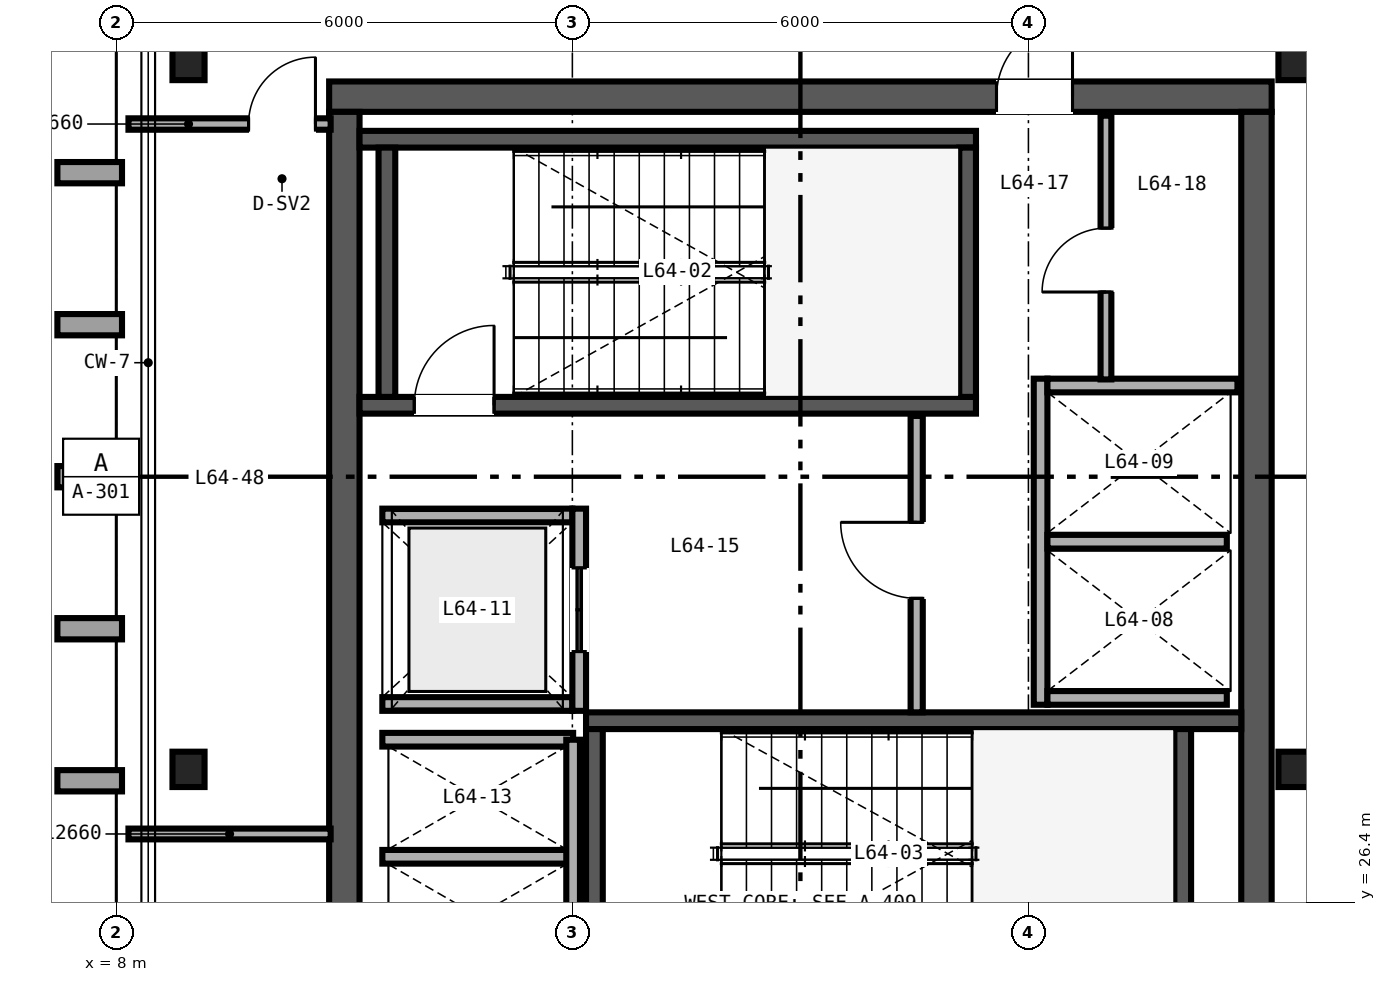
"""IFC4 building model, lengths in metres.
Left out: names, types, materials, properties, quantities, classifications, styles, units other than length and angle.
Written with IfcOpenShell. Run it as: python <this file> out.ifc"""

import sys

from ifc_helpers import new_model, si_unit, direction, frame, frame_2d, origin, origin_2d, place, context, subcontext, project, spatial, rectangle, i_section, extrude, source, transform, mapped, element, fill, save


model = new_model("IFC4")
c1 = context("Model", 3, precision=1e-05, world=origin(), true_north=direction((0.0, 1.0)))
c2 = subcontext(c1, "Body", "Model", "MODEL_VIEW")
j1 = project(units=[si_unit("LENGTHUNIT", "METRE"), si_unit("PLANEANGLEUNIT", "RADIAN")], contexts=[c1])
p1 = place(None, origin())
s1 = spatial("IfcSite", under=j1, at=p1, CompositionType="ELEMENT")
p2 = place(p1, origin())
s2 = spatial("IfcBuilding", under=s1, at=p2, CompositionType="ELEMENT")
p3 = place(p2, frame((0.0, 0.0, 254.4)))
s3 = spatial("IfcBuildingStorey", under=s2, at=p3, CompositionType="ELEMENT", Elevation=254.4)
p4 = place(p3, frame((10.8, 37.0, 0.0), z_axis=(0.0, 0.0, 1.0), x_axis=(1.0, 0.0, 0.0)))
e1 = element("IfcWall", 1, at=p4, inside=s3, PredefinedType="SHEAR", context=c2, shape_type="SweptSolid", body=[
    extrude(rectangle(XDim=12.4, YDim=0.4, at=frame_2d((6.2, 0.0))), origin(), (0.0, 0.0, 1.0), 3.38),
])
p5 = place(p4, frame((8.78, 0.0, 0.0)))
e2 = element("IfcOpeningElement", 2, at=p5, cuts=e1, PredefinedType="OPENING", context=c2, shape_type="SweptSolid", body=[
    extrude(rectangle(XDim=1.0, YDim=2.15, at=frame_2d((0.5, 1.075))), frame((0.0, 0.21, 0.0), z_axis=(0.0, -1.0, 0.0), x_axis=(1.0, 0.0, 0.0)), (0.0, 0.0, 1.0), 0.42),
])
for number, where, z_axis, x_axis in (
    (3, (11.0, 15.2, 0.0), (0.0, 0.0, 1.0), (0.0, 1.0, 0.0)),
    (4, (23.0, 15.2, 0.0), (0.0, 0.0, 1.0), (0.0, 1.0, 0.0)),
):
    element("IfcWall", number, at=place(p3, frame(where, z_axis=z_axis, x_axis=x_axis)), inside=s3, PredefinedType="SHEAR", context=c2, shape_type="SweptSolid", body=[
        extrude(rectangle(XDim=21.6, YDim=0.4, at=frame_2d((10.8, 0.0))), origin(), (0.0, 0.0, 1.0), 3.38),
    ])
p6 = place(p3, frame((11.2, 32.94, 0.0), z_axis=(0.0, 0.0, 1.0), x_axis=(1.0, 0.0, 0.0)))
e5 = element("IfcWall", 5, at=p6, inside=s3, PredefinedType="SHEAR", context=c2, shape_type="SweptSolid", body=[
    extrude(rectangle(XDim=8.11, YDim=0.22, at=frame_2d((4.055, 0.0))), origin(), (0.0, 0.0, 1.0), 3.4),
])
p7 = place(p6, frame((0.72, 0.0, 0.0)))
e6 = element("IfcOpeningElement", 6, at=p7, cuts=e5, PredefinedType="OPENING", context=c2, shape_type="SweptSolid", body=[
    extrude(rectangle(XDim=1.05, YDim=2.15, at=frame_2d((0.525, 1.075))), frame((0.0, 0.12, 0.0), z_axis=(0.0, -1.0, 0.0), x_axis=(1.0, 0.0, 0.0)), (0.0, 0.0, 1.0), 0.24),
])
p8 = place(p3, frame((11.2, 36.44, 0.0), z_axis=(0.0, 0.0, 1.0), x_axis=(1.0, 0.0, 0.0)))
e7 = element("IfcWall", 7, at=p8, inside=s3, PredefinedType="SHEAR", context=c2, shape_type="SweptSolid", body=[
    extrude(rectangle(XDim=8.11, YDim=0.22, at=frame_2d((4.055, 0.0))), origin(), (0.0, 0.0, 1.0), 3.4),
])
for number, where, z_axis, x_axis in (
    (8, (11.56, 33.05, 0.0), (0.0, 0.0, 1.0), (0.0, 1.0, 0.0)),
    (9, (19.2, 33.05, 0.0), (0.0, 0.0, 1.0), (0.0, 1.0, 0.0)),
):
    element("IfcWall", number, at=place(p3, frame(where, z_axis=z_axis, x_axis=x_axis)), inside=s3, PredefinedType="SHEAR", context=c2, shape_type="SweptSolid", body=[
        extrude(rectangle(XDim=3.28, YDim=0.22, at=frame_2d((1.64, 0.0))), origin(), (0.0, 0.0, 1.0), 3.4),
    ])
p9 = place(p3, frame((14.18, 28.79, 0.0), z_axis=(0.0, 0.0, 1.0), x_axis=(1.0, 0.0, 0.0)))
e10 = element("IfcWall", 10, at=p9, inside=s3, PredefinedType="SHEAR", context=c2, shape_type="SweptSolid", body=[
    extrude(rectangle(XDim=8.62, YDim=0.22, at=frame_2d((4.31, 0.0))), origin(), (0.0, 0.0, 1.0), 3.4),
])
for number, where, z_axis, x_axis in (
    (11, (14.29, 25.4, 0.0), (0.0, 0.0, 1.0), (0.0, 1.0, 0.0)),
    (12, (22.03, 25.4, 0.0), (0.0, 0.0, 1.0), (0.0, 1.0, 0.0)),
):
    element("IfcWall", number, at=place(p3, frame(where, z_axis=z_axis, x_axis=x_axis)), inside=s3, PredefinedType="SHEAR", context=c2, shape_type="SweptSolid", body=[
        extrude(rectangle(XDim=3.28, YDim=0.22, at=frame_2d((1.64, 0.0))), origin(), (0.0, 0.0, 1.0), 3.4),
    ])
m1 = source(origin(), c2, "Body", "SweptSolid", [
    extrude(i_section(OverallWidth=0.422, OverallDepth=0.465, WebThickness=0.045, FlangeThickness=0.073, FilletRadius=0.025, at=origin_2d()), origin(), (0.0, 0.0, 1.0), 3.38),
])
for number, where, z_axis, x_axis in (
    (13, (8.95, 28.15, 0.0), (0.0, 0.0, 1.0), (1.0, 0.0, 0.0)),
    (14, (23.5, 28.15, 0.0), (0.0, 0.0, 1.0), (1.0, 0.0, 0.0)),
    (15, (8.95, 37.45, 0.0), (0.0, 0.0, 1.0), (1.0, 0.0, 0.0)),
    (16, (23.5, 37.45, 0.0), (0.0, 0.0, 1.0), (1.0, 0.0, 0.0)),
):
    element("IfcColumn", number, at=place(p3, frame(where, z_axis=z_axis, x_axis=x_axis)), inside=s3, PredefinedType="COLUMN", context=c2, shape_type="MappedRepresentation", body=[
        mapped(m1, transform((0.0, 0.0, 0.0), scale=1.0)),
    ])
p10 = place(p3, frame((20.16, 29.0, 0.0), z_axis=(0.0, 0.0, 1.0), x_axis=(0.0, 1.0, 0.0)))
e17 = element("IfcWall", 17, at=p10, inside=s3, PredefinedType="SOLIDWALL", context=c2, shape_type="SweptSolid", body=[
    extrude(rectangle(XDim=4.29, YDim=0.18, at=frame_2d((2.145, 0.0))), origin(), (0.0, 0.0, 1.0), 3.38),
])
p11 = place(p3, frame((20.25, 29.09, 0.0), z_axis=(0.0, 0.0, 1.0), x_axis=(1.0, 0.0, 0.0)))
e18 = element("IfcWall", 18, at=p11, inside=s3, PredefinedType="SOLIDWALL", context=c2, shape_type="SweptSolid", body=[
    extrude(rectangle(XDim=2.36, YDim=0.18, at=frame_2d((1.18, 0.0))), origin(), (0.0, 0.0, 1.0), 3.38),
])
p12 = place(p3, frame((20.25, 33.2, 0.0), z_axis=(0.0, 0.0, 1.0), x_axis=(1.0, 0.0, 0.0)))
e19 = element("IfcWall", 19, at=p12, inside=s3, PredefinedType="SOLIDWALL", context=c2, shape_type="SweptSolid", body=[
    extrude(rectangle(XDim=2.5, YDim=0.18, at=frame_2d((1.25, 0.0))), origin(), (0.0, 0.0, 1.0), 3.38),
])
p13 = place(p3, frame((20.25, 31.145, 0.0), z_axis=(0.0, 0.0, 1.0), x_axis=(1.0, 0.0, 0.0)))
e20 = element("IfcWall", 20, at=p13, inside=s3, PredefinedType="SOLIDWALL", context=c2, shape_type="SweptSolid", body=[
    extrude(rectangle(XDim=2.36, YDim=0.18, at=frame_2d((1.18, 0.0))), origin(), (0.0, 0.0, 1.0), 3.38),
])
for number, where, z_axis, x_axis in (
    (21, (11.5, 29.01, 0.0), (0.0, 0.0, 1.0), (1.0, 0.0, 0.0)),
    (22, (11.5, 31.49, 0.0), (0.0, 0.0, 1.0), (1.0, 0.0, 0.0)),
):
    element("IfcWall", number, at=place(p3, frame(where, z_axis=z_axis, x_axis=x_axis)), inside=s3, PredefinedType="SOLIDWALL", context=c2, shape_type="SweptSolid", body=[
        extrude(rectangle(XDim=2.5, YDim=0.18, at=frame_2d((1.25, 0.0))), origin(), (0.0, 0.0, 1.0), 3.38),
    ])
p14 = place(p3, frame((14.09, 28.92, 0.0), z_axis=(0.0, 0.0, 1.0), x_axis=(0.0, 1.0, 0.0)))
e23 = element("IfcWall", 23, at=p14, inside=s3, PredefinedType="SOLIDWALL", context=c2, shape_type="SweptSolid", body=[
    extrude(rectangle(XDim=2.66, YDim=0.18, at=frame_2d((1.33, 0.0))), origin(), (0.0, 0.0, 1.0), 3.38),
])
p15 = place(p14, frame((0.78, 0.0, 0.0)))
e24 = element("IfcOpeningElement", 24, at=p15, cuts=e23, PredefinedType="OPENING", context=c2, shape_type="SweptSolid", body=[
    extrude(rectangle(XDim=1.1, YDim=2.2, at=frame_2d((0.55, 1.1))), frame((0.0, 0.1, 0.0), z_axis=(0.0, -1.0, 0.0), x_axis=(1.0, 0.0, 0.0)), (0.0, 0.0, 1.0), 0.2),
])
for number, where, z_axis, x_axis in (
    (25, (11.5, 27.0, 0.0), (0.0, 0.0, 1.0), (1.0, 0.0, 0.0)),
    (26, (11.5, 28.54, 0.0), (0.0, 0.0, 1.0), (1.0, 0.0, 0.0)),
):
    element("IfcWall", number, at=place(p3, frame(where, z_axis=z_axis, x_axis=x_axis)), inside=s3, PredefinedType="SOLIDWALL", context=c2, shape_type="SweptSolid", body=[
        extrude(rectangle(XDim=2.51, YDim=0.18, at=frame_2d((1.255, 0.0))), origin(), (0.0, 0.0, 1.0), 3.38),
    ])
p16 = place(p3, frame((14.01, 25.46, 0.0), z_axis=(0.0, 0.0, 1.0), x_axis=(0.0, 1.0, 0.0)))
e27 = element("IfcWall", 27, at=p16, inside=s3, PredefinedType="SOLIDWALL", context=c2, shape_type="SweptSolid", body=[
    extrude(rectangle(XDim=3.08, YDim=0.18, at=frame_2d((1.54, 0.0))), origin(), (0.0, 0.0, 1.0), 3.38),
])
p17 = place(p3, frame((18.53, 28.9, 0.0), z_axis=(0.0, 0.0, 1.0), x_axis=(0.0, 1.0, 0.0)))
e28 = element("IfcWall", 28, at=p17, inside=s3, PredefinedType="PARTITIONING", context=c2, shape_type="SweptSolid", body=[
    extrude(rectangle(XDim=3.9, YDim=0.16, at=frame_2d((1.95, 0.0))), origin(), (0.0, 0.0, 1.0), 3.38),
])
p18 = place(p17, frame((1.5, 0.0, 0.0)))
e29 = element("IfcOpeningElement", 29, at=p18, cuts=e28, PredefinedType="OPENING", context=c2, shape_type="SweptSolid", body=[
    extrude(rectangle(XDim=1.0, YDim=2.15, at=frame_2d((0.5, 1.075))), frame((0.0, 0.09, 0.0), z_axis=(0.0, -1.0, 0.0), x_axis=(1.0, 0.0, 0.0)), (0.0, 0.0, 1.0), 0.18),
])
p19 = place(p3, frame((21.02, 33.28, 0.0), z_axis=(0.0, 0.0, 1.0), x_axis=(0.0, 1.0, 0.0)))
e30 = element("IfcWall", 30, at=p19, inside=s3, PredefinedType="PARTITIONING", context=c2, shape_type="SweptSolid", body=[
    extrude(rectangle(XDim=3.47, YDim=0.142, at=frame_2d((1.735, 0.0))), origin(), (0.0, 0.0, 1.0), 3.38),
])
p20 = place(p19, frame((1.15, 0.0, 0.0)))
e31 = element("IfcOpeningElement", 31, at=p20, cuts=e30, PredefinedType="OPENING", context=c2, shape_type="SweptSolid", body=[
    extrude(rectangle(XDim=0.84, YDim=2.1, at=frame_2d((0.42, 1.05))), frame((0.0, 0.081, 0.0), z_axis=(0.0, -1.0, 0.0), x_axis=(1.0, 0.0, 0.0)), (0.0, 0.0, 1.0), 0.162),
])
p21 = place(p3, frame((8.16, 36.64, 0.0), z_axis=(0.0, 0.0, 1.0), x_axis=(1.0, 0.0, 0.0)))
e32 = element("IfcWall", 32, at=p21, inside=s3, PredefinedType="PARTITIONING", context=c2, shape_type="SweptSolid", body=[
    extrude(rectangle(XDim=2.66, YDim=0.15, at=frame_2d((1.33, 0.0))), origin(), (0.0, 0.0, 1.0), 2.763),
])
p22 = place(p21, frame((1.58, 0.0, 0.0)))
e33 = element("IfcOpeningElement", 33, at=p22, cuts=e32, PredefinedType="OPENING", context=c2, shape_type="SweptSolid", body=[
    extrude(rectangle(XDim=0.88, YDim=2.15, at=frame_2d((0.44, 1.075))), frame((0.0, 0.085, 0.0), z_axis=(0.0, -1.0, 0.0), x_axis=(1.0, 0.0, 0.0)), (0.0, 0.0, 1.0), 0.17),
])
p23 = place(p3, frame((8.16, 27.3, 0.0), z_axis=(0.0, 0.0, 1.0), x_axis=(1.0, 0.0, 0.0)))
e34 = element("IfcWall", 34, at=p23, inside=s3, PredefinedType="PARTITIONING", context=c2, shape_type="SweptSolid", body=[
    extrude(rectangle(XDim=2.66, YDim=0.142, at=frame_2d((1.33, 0.0))), origin(), (0.0, 0.0, 1.0), 2.601),
])
m2 = source(origin(), c2, "Body", "SweptSolid", [
    extrude(rectangle(XDim=1.05, YDim=2.15, at=frame_2d((0.525, 1.075))), frame((0.0, 0.025, 0.0), z_axis=(0.0, -1.0, 0.0), x_axis=(1.0, 0.0, 0.0)), (0.0, 0.0, 1.0), 0.05),
])
p24 = place(p7, origin())
e35 = element("IfcDoor", 35, at=p24, inside=s3, OperationType="SINGLE_SWING_RIGHT", PredefinedType="DOOR", context=c2, shape_type="MappedRepresentation", body=[
    mapped(m2, transform((0.0, 0.0, 0.0), scale=1.0)),
])
fill(e6, e35)
m3 = source(origin(), c2, "Body", "SweptSolid", [
    extrude(rectangle(XDim=1.1, YDim=2.2, at=frame_2d((0.55, 1.1))), frame((0.0, 0.025, 0.0), z_axis=(0.0, -1.0, 0.0), x_axis=(1.0, 0.0, 0.0)), (0.0, 0.0, 1.0), 0.05),
])
p25 = place(p15, origin())
e36 = element("IfcDoor", 36, at=p25, inside=s3, OperationType="DOUBLE_DOOR_SLIDING", PredefinedType="DOOR", context=c2, shape_type="MappedRepresentation", body=[
    mapped(m3, transform((0.0, 0.0, 0.0), scale=1.0)),
])
fill(e24, e36)
m4 = source(origin(), c2, "Body", "SweptSolid", [
    extrude(rectangle(XDim=1.0, YDim=2.15, at=frame_2d((0.5, 1.075))), frame((0.0, 0.025, 0.0), z_axis=(0.0, -1.0, 0.0), x_axis=(1.0, 0.0, 0.0)), (0.0, 0.0, 1.0), 0.05),
])
p26 = place(p18, origin())
e37 = element("IfcDoor", 37, at=p26, inside=s3, OperationType="SINGLE_SWING_RIGHT", PredefinedType="DOOR", context=c2, shape_type="MappedRepresentation", body=[
    mapped(m4, transform((0.0, 0.0, 0.0), scale=1.0)),
])
fill(e29, e37)
m5 = source(origin(), c2, "Body", "SweptSolid", [
    extrude(rectangle(XDim=0.84, YDim=2.1, at=frame_2d((0.42, 1.05))), frame((0.0, 0.025, 0.0), z_axis=(0.0, -1.0, 0.0), x_axis=(1.0, 0.0, 0.0)), (0.0, 0.0, 1.0), 0.05),
])
p27 = place(p20, origin())
e38 = element("IfcDoor", 38, at=p27, inside=s3, OperationType="SINGLE_SWING_LEFT", PredefinedType="DOOR", context=c2, shape_type="MappedRepresentation", body=[
    mapped(m5, transform((0.0, 0.0, 0.0), scale=1.0)),
])
fill(e31, e38)
p28 = place(p5, origin())
e39 = element("IfcDoor", 39, at=p28, inside=s3, OperationType="SINGLE_SWING_RIGHT", PredefinedType="DOOR", context=c2, shape_type="MappedRepresentation", body=[
    mapped(m4, transform((0.0, 0.0, 0.0), scale=1.0)),
])
fill(e2, e39)
m6 = source(origin(), c2, "Body", "SweptSolid", [
    extrude(rectangle(XDim=0.88, YDim=2.15, at=frame_2d((0.44, 1.075))), frame((0.0, 0.025, 0.0), z_axis=(0.0, -1.0, 0.0), x_axis=(1.0, 0.0, 0.0)), (0.0, 0.0, 1.0), 0.05),
])
p29 = place(p22, origin())
e40 = element("IfcDoor", 40, at=p29, inside=s3, OperationType="SINGLE_SWING_RIGHT", PredefinedType="DOOR", context=c2, shape_type="MappedRepresentation", body=[
    mapped(m6, transform((0.0, 0.0, 0.0), scale=1.0)),
])
fill(e33, e40)
save(model, sys.argv[1])
